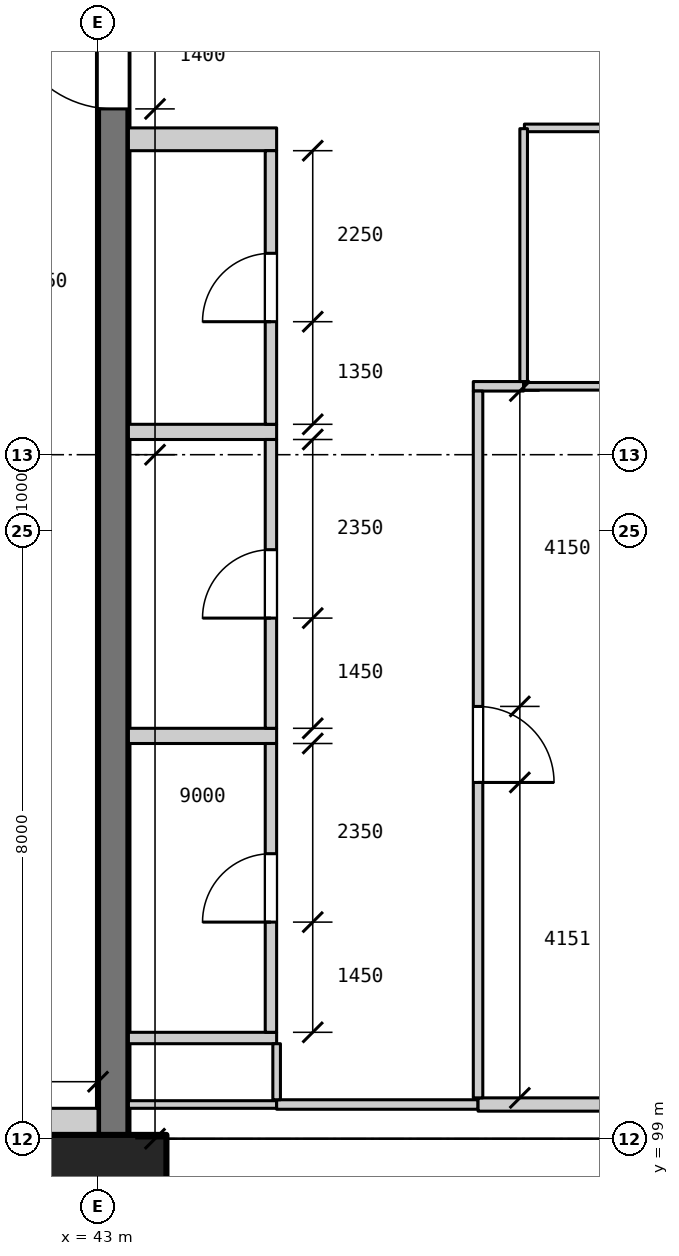
"""IFC4 building model, lengths in metres.
Left out: names, types, materials, properties, quantities, classifications, styles, units other than length and angle.
Written with IfcOpenShell. Run it as: python <this file> out.ifc"""

import sys

from ifc_helpers import new_model, si_unit, direction, frame, frame_2d, origin, origin_2d, place, context, subcontext, project, spatial, rectangle, extrude, element, fill, save


model = new_model("IFC4")
c1 = context("Model", 3, precision=1e-05, world=origin(), true_north=direction((0.0, 1.0)))
c2 = subcontext(c1, "Body", "Model", "MODEL_VIEW")
j1 = project(units=[si_unit("LENGTHUNIT", "METRE"), si_unit("PLANEANGLEUNIT", "RADIAN")], contexts=[c1])
p1 = place(None, origin())
s1 = spatial("IfcSite", under=j1, at=p1, CompositionType="ELEMENT")
p2 = place(p1, origin())
s2 = spatial("IfcBuilding", under=s1, at=p2, CompositionType="ELEMENT")
p3 = place(p2, origin())
s3 = spatial("IfcBuildingStorey", under=s2, at=p3, CompositionType="ELEMENT", Elevation=0.0)
p4 = place(p3, frame((43.2, 99.0, 0.0), z_axis=(0.0, 0.0, 1.0), x_axis=(0.0, 1.0, 0.0)))
e1 = element("IfcWall", 1, at=p4, inside=s3, PredefinedType="SHEAR", context=c2, shape_type="SweptSolid", body=[
    extrude(rectangle(XDim=26.55, YDim=0.4, at=frame_2d((13.275, 0.0))), origin(), (0.0, 0.0, 1.0), 6.0),
])
p5 = place(p4, frame((13.55, 0.0, 0.0)))
e2 = element("IfcOpeningElement", 2, at=p5, cuts=e1, PredefinedType="OPENING", context=c2, shape_type="SweptSolid", body=[
    extrude(rectangle(XDim=1.4, YDim=2.4, at=frame_2d((0.7, 1.2))), frame((0.0, 0.21, 0.0), z_axis=(0.0, -1.0, 0.0), x_axis=(1.0, 0.0, 0.0)), (0.0, 0.0, 1.0), 0.42),
])
p6 = place(p3, frame((43.0, 98.55, 0.0), z_axis=(0.0, 0.0, 1.0), x_axis=(1.0, 0.0, 0.0)))
e3 = element("IfcColumn", 3, at=p6, inside=s3, PredefinedType="COLUMN", context=c2, shape_type="SweptSolid", body=[
    extrude(rectangle(XDim=1.8, YDim=1.0, at=origin_2d()), origin(), (0.0, 0.0, 1.0), 6.0),
])
p7 = place(p3, frame((29.6, 99.2, 0.0), z_axis=(0.0, 0.0, 1.0), x_axis=(1.0, 0.0, 0.0)))
e4 = element("IfcWall", 4, at=p7, inside=s3, PredefinedType="PARTITIONING", context=c2, shape_type="SweptSolid", body=[
    extrude(rectangle(XDim=13.4, YDim=0.4, at=frame_2d((6.7, 0.0))), origin(), (0.0, 0.0, 1.0), 5.8),
])
p8 = place(p7, frame((9.2, 0.0, 0.0)))
e5 = element("IfcOpeningElement", 5, at=p8, cuts=e4, PredefinedType="OPENING", context=c2, shape_type="SweptSolid", body=[
    extrude(rectangle(XDim=2.4, YDim=2.4, at=frame_2d((1.2, 1.2))), frame((0.0, 0.21, 0.0), z_axis=(0.0, -1.0, 0.0), x_axis=(1.0, 0.0, 0.0)), (0.0, 0.0, 1.0), 0.42),
])
p9 = place(p3, frame((43.4, 100.325, 0.0), z_axis=(0.0, 0.0, 1.0), x_axis=(1.0, 0.0, 0.0)))
e6 = element("IfcWall", 6, at=p9, inside=s3, PredefinedType="PARTITIONING", context=c2, shape_type="SweptSolid", body=[
    extrude(rectangle(XDim=1.95, YDim=0.15, at=frame_2d((0.975, 0.0))), origin(), (0.0, 0.0, 1.0), 5.7),
])
for number, where, z_axis, x_axis in (
    (7, (43.4, 104.3, 0.0), (0.0, 0.0, 1.0), (1.0, 0.0, 0.0)),
    (8, (43.4, 108.3, 0.0), (0.0, 0.0, 1.0), (1.0, 0.0, 0.0)),
):
    element("IfcWall", number, at=place(p3, frame(where, z_axis=z_axis, x_axis=x_axis)), inside=s3, PredefinedType="PARTITIONING", context=c2, shape_type="SweptSolid", body=[
        extrude(rectangle(XDim=1.95, YDim=0.2, at=frame_2d((0.975, 0.0))), origin(), (0.0, 0.0, 1.0), 5.7),
    ])
p10 = place(p3, frame((43.4, 112.15, 0.0), z_axis=(0.0, 0.0, 1.0), x_axis=(1.0, 0.0, 0.0)))
e9 = element("IfcWall", 9, at=p10, inside=s3, PredefinedType="PARTITIONING", context=c2, shape_type="SweptSolid", body=[
    extrude(rectangle(XDim=1.95, YDim=0.3, at=frame_2d((0.975, 0.0))), origin(), (0.0, 0.0, 1.0), 5.7),
])
p11 = place(p3, frame((45.275, 100.4, 0.0), z_axis=(0.0, 0.0, 1.0), x_axis=(0.0, 1.0, 0.0)))
e10 = element("IfcWall", 10, at=p11, inside=s3, PredefinedType="PARTITIONING", context=c2, shape_type="SweptSolid", body=[
    extrude(rectangle(XDim=3.8, YDim=0.15, at=frame_2d((1.9, 0.0))), origin(), (0.0, 0.0, 1.0), 5.7),
])
p12 = place(p11, frame((1.45, 0.0, 0.0)))
e11 = element("IfcOpeningElement", 11, at=p12, cuts=e10, PredefinedType="OPENING", context=c2, shape_type="SweptSolid", body=[
    extrude(rectangle(XDim=0.9, YDim=2.1, at=frame_2d((0.45, 1.05))), frame((0.0, 0.085, 0.0), z_axis=(0.0, -1.0, 0.0), x_axis=(1.0, 0.0, 0.0)), (0.0, 0.0, 1.0), 0.17),
])
p13 = place(p3, frame((45.275, 104.4, 0.0), z_axis=(0.0, 0.0, 1.0), x_axis=(0.0, 1.0, 0.0)))
e12 = element("IfcWall", 12, at=p13, inside=s3, PredefinedType="PARTITIONING", context=c2, shape_type="SweptSolid", body=[
    extrude(rectangle(XDim=3.8, YDim=0.15, at=frame_2d((1.9, 0.0))), origin(), (0.0, 0.0, 1.0), 5.7),
])
p14 = place(p13, frame((1.45, 0.0, 0.0)))
e13 = element("IfcOpeningElement", 13, at=p14, cuts=e12, PredefinedType="OPENING", context=c2, shape_type="SweptSolid", body=[
    extrude(rectangle(XDim=0.9, YDim=2.1, at=frame_2d((0.45, 1.05))), frame((0.0, 0.085, 0.0), z_axis=(0.0, -1.0, 0.0), x_axis=(1.0, 0.0, 0.0)), (0.0, 0.0, 1.0), 0.17),
])
p15 = place(p3, frame((45.275, 108.4, 0.0), z_axis=(0.0, 0.0, 1.0), x_axis=(0.0, 1.0, 0.0)))
e14 = element("IfcWall", 14, at=p15, inside=s3, PredefinedType="PARTITIONING", context=c2, shape_type="SweptSolid", body=[
    extrude(rectangle(XDim=3.6, YDim=0.15, at=frame_2d((1.8, 0.0))), origin(), (0.0, 0.0, 1.0), 5.7),
])
p16 = place(p15, frame((1.35, 0.0, 0.0)))
e15 = element("IfcOpeningElement", 15, at=p16, cuts=e14, PredefinedType="OPENING", context=c2, shape_type="SweptSolid", body=[
    extrude(rectangle(XDim=0.9, YDim=2.1, at=frame_2d((0.45, 1.05))), frame((0.0, 0.085, 0.0), z_axis=(0.0, -1.0, 0.0), x_axis=(1.0, 0.0, 0.0)), (0.0, 0.0, 1.0), 0.17),
])
p17 = place(p3, frame((43.4, 99.45, 0.0), z_axis=(0.0, 0.0, 1.0), x_axis=(1.0, 0.0, 0.0)))
e16 = element("IfcWall", 16, at=p17, inside=s3, PredefinedType="PARTITIONING", context=c2, shape_type="SweptSolid", body=[
    extrude(rectangle(XDim=1.95, YDim=0.1, at=frame_2d((0.975, 0.0))), origin(), (0.0, 0.0, 1.0), 5.8),
])
p18 = place(p3, frame((45.35, 99.45, 0.0), z_axis=(0.0, 0.0, 1.0), x_axis=(1.0, 0.0, 0.0)))
e17 = element("IfcWall", 17, at=p18, inside=s3, PredefinedType="PARTITIONING", context=c2, shape_type="SweptSolid", body=[
    extrude(rectangle(XDim=2.65, YDim=0.125, at=frame_2d((1.325, 0.0))), origin(), (0.0, 0.0, 1.0), 5.7),
])
p19 = place(p3, frame((48.0, 99.45, 0.0), z_axis=(0.0, 0.0, 1.0), x_axis=(1.0, 0.0, 0.0)))
e18 = element("IfcWall", 18, at=p19, inside=s3, PredefinedType="PARTITIONING", context=c2, shape_type="SweptSolid", body=[
    extrude(rectangle(XDim=2.6, YDim=0.175, at=frame_2d((1.3, 0.0))), origin(), (0.0, 0.0, 1.0), 5.7),
])
p20 = place(p3, frame((47.938, 108.9, 0.0), z_axis=(0.0, 0.0, 1.0), x_axis=(1.0, 0.0, 0.0)))
e19 = element("IfcWall", 19, at=p20, inside=s3, PredefinedType="PARTITIONING", context=c2, shape_type="SweptSolid", body=[
    extrude(rectangle(XDim=0.663, YDim=0.125, at=frame_2d((0.331, 0.0))), origin(), (0.0, 0.0, 1.0), 5.7),
])
p21 = place(p3, frame((48.6, 108.9, 0.0), z_axis=(0.0, 0.0, 1.0), x_axis=(1.0, 0.0, 0.0)))
e20 = element("IfcWall", 20, at=p21, inside=s3, PredefinedType="PARTITIONING", context=c2, shape_type="SweptSolid", body=[
    extrude(rectangle(XDim=8.95, YDim=0.1, at=frame_2d((4.475, 0.0))), origin(), (0.0, 0.0, 1.0), 5.7),
])
p22 = place(p3, frame((48.61, 112.3, 0.0), z_axis=(0.0, 0.0, 1.0), x_axis=(1.0, 0.0, 0.0)))
e21 = element("IfcWall", 21, at=p22, inside=s3, PredefinedType="PARTITIONING", context=c2, shape_type="SweptSolid", body=[
    extrude(rectangle(XDim=8.94, YDim=0.1, at=frame_2d((4.47, 0.0))), origin(), (0.0, 0.0, 1.0), 5.7),
])
p23 = place(p3, frame((45.35, 99.512, 0.0), z_axis=(0.0, 0.0, 1.0), x_axis=(0.0, 1.0, 0.0)))
e22 = element("IfcWall", 22, at=p23, inside=s3, PredefinedType="PARTITIONING", context=c2, shape_type="SweptSolid", body=[
    extrude(rectangle(XDim=0.738, YDim=0.1, at=frame_2d((0.369, 0.0))), origin(), (0.0, 0.0, 1.0), 5.7),
])
p24 = place(p3, frame((48.0, 99.538, 0.0), z_axis=(0.0, 0.0, 1.0), x_axis=(0.0, 1.0, 0.0)))
e23 = element("IfcWall", 23, at=p24, inside=s3, PredefinedType="PARTITIONING", context=c2, shape_type="SweptSolid", body=[
    extrude(rectangle(XDim=9.3, YDim=0.125, at=frame_2d((4.65, 0.0))), origin(), (0.0, 0.0, 1.0), 5.7),
])
p25 = place(p24, frame((4.15, 0.0, 0.0)))
e24 = element("IfcOpeningElement", 24, at=p25, cuts=e23, PredefinedType="OPENING", context=c2, shape_type="SweptSolid", body=[
    extrude(rectangle(XDim=1.0, YDim=2.1, at=frame_2d((0.5, 1.05))), frame((0.0, 0.073, 0.0), z_axis=(0.0, -1.0, 0.0), x_axis=(1.0, 0.0, 0.0)), (0.0, 0.0, 1.0), 0.145),
])
p26 = place(p3, frame((48.6, 108.962, 0.0), z_axis=(0.0, 0.0, 1.0), x_axis=(0.0, 1.0, 0.0)))
e25 = element("IfcWall", 25, at=p26, inside=s3, PredefinedType="PARTITIONING", context=c2, shape_type="SweptSolid", body=[
    extrude(rectangle(XDim=3.328, YDim=0.1, at=frame_2d((1.664, 0.0))), origin(), (0.0, 0.0, 1.0), 5.7),
])
p27 = place(p12, origin())
e26 = element("IfcDoor", 26, at=p27, inside=s3, OperationType="SINGLE_SWING_LEFT", PredefinedType="DOOR", context=c2, shape_type="SweptSolid", body=[
    extrude(rectangle(XDim=0.9, YDim=2.1, at=frame_2d((0.45, 1.05))), frame((0.0, 0.025, 0.0), z_axis=(0.0, -1.0, 0.0), x_axis=(1.0, 0.0, 0.0)), (0.0, 0.0, 1.0), 0.05),
])
fill(e11, e26)
p28 = place(p25, frame((1.0, 0.0, 0.0), z_axis=(0.0, 0.0, 1.0), x_axis=(-1.0, 0.0, 0.0)))
e27 = element("IfcDoor", 27, at=p28, inside=s3, OperationType="SINGLE_SWING_RIGHT", PredefinedType="DOOR", context=c2, shape_type="SweptSolid", body=[
    extrude(rectangle(XDim=1.0, YDim=2.1, at=frame_2d((0.5, 1.05))), frame((0.0, 0.025, 0.0), z_axis=(0.0, -1.0, 0.0), x_axis=(1.0, 0.0, 0.0)), (0.0, 0.0, 1.0), 0.05),
])
fill(e24, e27)
p29 = place(p14, origin())
e28 = element("IfcDoor", 28, at=p29, inside=s3, OperationType="SINGLE_SWING_LEFT", PredefinedType="DOOR", context=c2, shape_type="SweptSolid", body=[
    extrude(rectangle(XDim=0.9, YDim=2.1, at=frame_2d((0.45, 1.05))), frame((0.0, 0.025, 0.0), z_axis=(0.0, -1.0, 0.0), x_axis=(1.0, 0.0, 0.0)), (0.0, 0.0, 1.0), 0.05),
])
fill(e13, e28)
p30 = place(p16, origin())
e29 = element("IfcDoor", 29, at=p30, inside=s3, OperationType="SINGLE_SWING_LEFT", PredefinedType="DOOR", context=c2, shape_type="SweptSolid", body=[
    extrude(rectangle(XDim=0.9, YDim=2.1, at=frame_2d((0.45, 1.05))), frame((0.0, 0.025, 0.0), z_axis=(0.0, -1.0, 0.0), x_axis=(1.0, 0.0, 0.0)), (0.0, 0.0, 1.0), 0.05),
])
fill(e15, e29)
p31 = place(p5, origin())
e30 = element("IfcDoor", 30, at=p31, inside=s3, OperationType="SINGLE_SWING_RIGHT", PredefinedType="DOOR", context=c2, shape_type="SweptSolid", body=[
    extrude(rectangle(XDim=1.4, YDim=2.4, at=frame_2d((0.7, 1.2))), frame((0.0, 0.025, 0.0), z_axis=(0.0, -1.0, 0.0), x_axis=(1.0, 0.0, 0.0)), (0.0, 0.0, 1.0), 0.05),
])
fill(e2, e30)
save(model, sys.argv[1])
